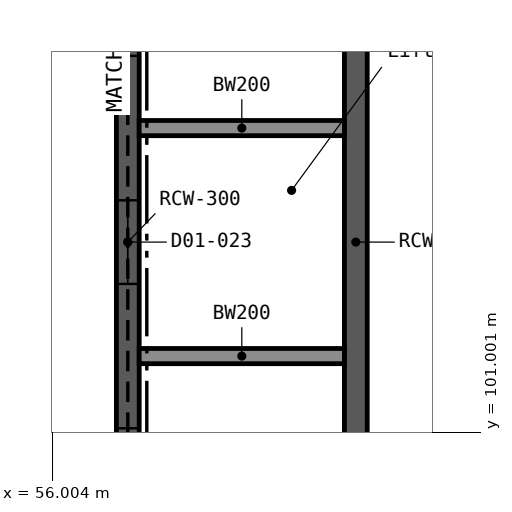
"""IFC4 building model, lengths in metres.
Left out: names, types, materials, properties, quantities, classifications, styles, units other than length and angle.
Written with IfcOpenShell. Run it as: python <this file> out.ifc"""

import sys

from ifc_helpers import new_model, si_unit, direction, frame, frame_2d, origin, place, context, subcontext, project, spatial, rectangle, extrude, element, fill, save


model = new_model("IFC4")
c1 = context("Model", 3, precision=1e-05, world=origin(), true_north=direction((0.0, 1.0)))
c2 = subcontext(c1, "Body", "Model", "MODEL_VIEW")
j1 = project(units=[si_unit("LENGTHUNIT", "METRE"), si_unit("PLANEANGLEUNIT", "RADIAN")], contexts=[c1])
p1 = place(None, origin())
s1 = spatial("IfcSite", under=j1, at=p1, CompositionType="ELEMENT")
p2 = place(p1, origin())
s2 = spatial("IfcBuilding", under=s1, at=p2, CompositionType="ELEMENT")
p3 = place(p2, frame((0.0, 0.0, 5.4)))
s3 = spatial("IfcBuildingStorey", under=s2, at=p3, CompositionType="ELEMENT", Elevation=5.4)
p4 = place(p3, frame((57.0, 99.15, 0.0), z_axis=(0.0, 0.0, 1.0), x_axis=(0.0, 1.0, 0.0)))
e1 = element("IfcWall", 1, at=p4, inside=s3, PredefinedType="SHEAR", context=c2, shape_type="SweptSolid", body=[
    extrude(rectangle(XDim=8.7, YDim=0.3, at=frame_2d((4.35, 0.0))), origin(), (0.0, 0.0, 1.0), 5.4),
])
p5 = place(p4, frame((0.8, 0.0, 0.0)))
e2 = element("IfcOpeningElement", 2, at=p5, cuts=e1, PredefinedType="OPENING", context=c2, shape_type="SweptSolid", body=[
    extrude(rectangle(XDim=1.1, YDim=2.1, at=frame_2d((0.55, 1.05))), frame((0.0, 0.161, 0.0), z_axis=(0.0, -1.0, 0.0), x_axis=(1.0, 0.0, 0.0)), (0.0, 0.0, 1.0), 0.322),
])
p6 = place(p4, frame((3.8, 0.0, 0.0)))
e3 = element("IfcOpeningElement", 3, at=p6, cuts=e1, PredefinedType="OPENING", context=c2, shape_type="SweptSolid", body=[
    extrude(rectangle(XDim=1.1, YDim=2.1, at=frame_2d((0.55, 1.05))), frame((0.0, 0.161, 0.0), z_axis=(0.0, -1.0, 0.0), x_axis=(1.0, 0.0, 0.0)), (0.0, 0.0, 1.0), 0.322),
])
p7 = place(p4, frame((6.8, 0.0, 0.0)))
e4 = element("IfcOpeningElement", 4, at=p7, cuts=e1, PredefinedType="OPENING", context=c2, shape_type="SweptSolid", body=[
    extrude(rectangle(XDim=1.1, YDim=2.1, at=frame_2d((0.55, 1.05))), frame((0.0, 0.161, 0.0), z_axis=(0.0, -1.0, 0.0), x_axis=(1.0, 0.0, 0.0)), (0.0, 0.0, 1.0), 0.322),
])
p8 = place(p3, frame((60.0, 99.15, 0.0), z_axis=(0.0, 0.0, 1.0), x_axis=(0.0, 1.0, 0.0)))
e5 = element("IfcWall", 5, at=p8, inside=s3, PredefinedType="SHEAR", context=c2, shape_type="SweptSolid", body=[
    extrude(rectangle(XDim=8.7, YDim=0.3, at=frame_2d((4.35, 0.0))), origin(), (0.0, 0.0, 1.0), 5.4),
])
for number, where, z_axis, x_axis in (
    (6, (57.15, 102.0, 0.0), (0.0, 0.0, 1.0), (1.0, 0.0, 0.0)),
    (7, (57.15, 105.0, 0.0), (0.0, 0.0, 1.0), (1.0, 0.0, 0.0)),
):
    element("IfcWall", number, at=place(p3, frame(where, z_axis=z_axis, x_axis=x_axis)), inside=s3, PredefinedType="SOLIDWALL", context=c2, shape_type="SweptSolid", body=[
        extrude(rectangle(XDim=2.7, YDim=0.2, at=frame_2d((1.35, 0.0))), origin(), (0.0, 0.0, 1.0), 5.4),
    ])
p9 = place(p5, origin())
e8 = element("IfcDoor", 8, at=p9, inside=s3, OperationType="DOUBLE_DOOR_SLIDING", PredefinedType="DOOR", context=c2, shape_type="SweptSolid", body=[
    extrude(rectangle(XDim=1.1, YDim=2.1, at=frame_2d((0.55, 1.05))), frame((0.0, 0.025, 0.0), z_axis=(0.0, -1.0, 0.0), x_axis=(1.0, 0.0, 0.0)), (0.0, 0.0, 1.0), 0.05),
])
fill(e2, e8)
p10 = place(p6, origin())
e9 = element("IfcDoor", 9, at=p10, inside=s3, OperationType="DOUBLE_DOOR_SLIDING", PredefinedType="DOOR", context=c2, shape_type="SweptSolid", body=[
    extrude(rectangle(XDim=1.1, YDim=2.1, at=frame_2d((0.55, 1.05))), frame((0.0, 0.025, 0.0), z_axis=(0.0, -1.0, 0.0), x_axis=(1.0, 0.0, 0.0)), (0.0, 0.0, 1.0), 0.05),
])
fill(e3, e9)
p11 = place(p7, origin())
e10 = element("IfcDoor", 10, at=p11, inside=s3, OperationType="DOUBLE_DOOR_SLIDING", PredefinedType="DOOR", context=c2, shape_type="SweptSolid", body=[
    extrude(rectangle(XDim=1.1, YDim=2.1, at=frame_2d((0.55, 1.05))), frame((0.0, 0.025, 0.0), z_axis=(0.0, -1.0, 0.0), x_axis=(1.0, 0.0, 0.0)), (0.0, 0.0, 1.0), 0.05),
])
fill(e4, e10)
save(model, sys.argv[1])
